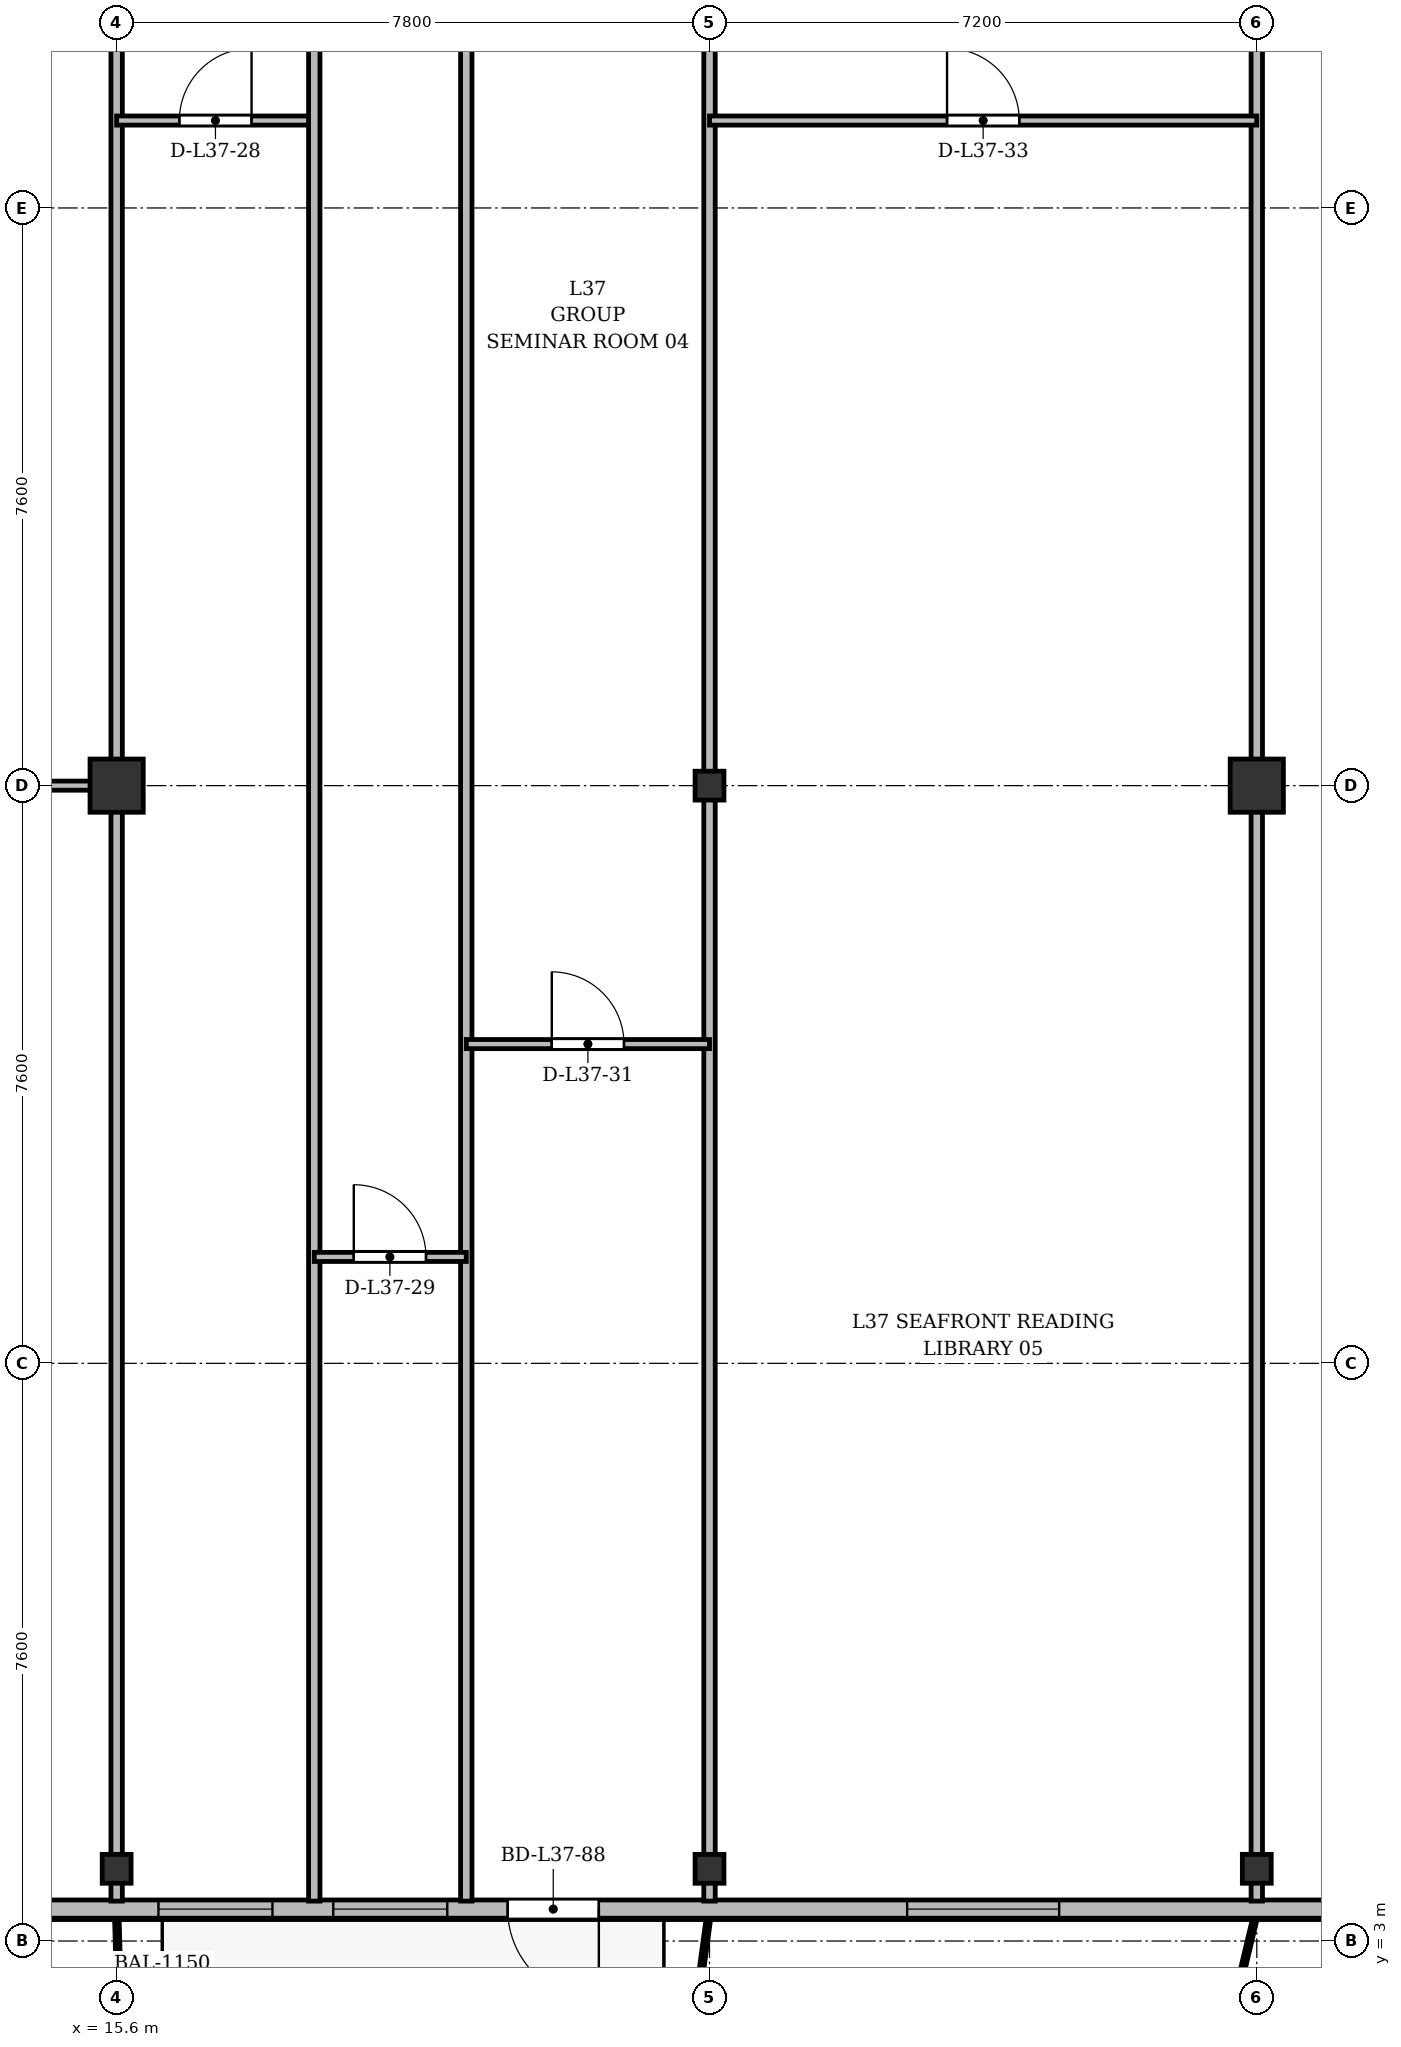
"""IFC4 building model, lengths in metres.
Left out: names, types, materials, properties, quantities, classifications, styles, units other than length and angle.
Written with IfcOpenShell. Run it as: python <this file> out.ifc"""

import sys

from ifc_helpers import new_model, si_unit, direction, frame, frame_2d, origin, origin_2d, place, context, subcontext, project, spatial, rectangle, i_section, extrude, source, transform, mapped, element, fill, save


model = new_model("IFC4")
c1 = context("Model", 3, precision=1e-05, world=origin(), true_north=direction((0.0, 1.0)))
c2 = subcontext(c1, "Body", "Model", "MODEL_VIEW")
j1 = project(units=[si_unit("LENGTHUNIT", "METRE"), si_unit("PLANEANGLEUNIT", "RADIAN")], contexts=[c1])
p1 = place(None, origin())
s1 = spatial("IfcSite", under=j1, at=p1, CompositionType="ELEMENT")
p2 = place(p1, origin())
s2 = spatial("IfcBuilding", under=s1, at=p2, CompositionType="ELEMENT")
p3 = place(p2, frame((0.0, 0.0, 142.9)))
s3 = spatial("IfcBuildingStorey", under=s2, at=p3, CompositionType="ELEMENT", Elevation=142.9)
m1 = source(origin(), c2, "Body", "SweptSolid", [
    extrude(i_section(OverallWidth=0.38, OverallDepth=0.38, WebThickness=0.02, FlangeThickness=0.03, at=origin_2d()), origin(), (0.0, 0.0, 1.0), 3.6),
])
p4 = place(p3, frame((15.6, 3.95, 0.0), z_axis=(0.0, 0.0, 1.0), x_axis=(1.0, 0.0, 0.0)))
e1 = element("IfcColumn", 1, at=p4, inside=s3, PredefinedType="COLUMN", context=c2, shape_type="MappedRepresentation", body=[
    mapped(m1, transform((0.0, 0.0, 0.0), x_axis=(1.0, 0.0, 0.0), y_axis=(0.0, 1.0, 0.0), z_axis=(0.0, 0.0, 1.0), scale=1.0)),
])
m2 = source(origin(), c2, "Body", "SweptSolid", [
    extrude(rectangle(XDim=0.7, YDim=0.7, at=origin_2d()), origin(), (0.0, 0.0, 1.0), 3.6),
])
p5 = place(p3, frame((15.6, 18.2, 0.0), z_axis=(0.0, 0.0, 1.0), x_axis=(1.0, 0.0, 0.0)))
e2 = element("IfcColumn", 2, at=p5, inside=s3, PredefinedType="COLUMN", context=c2, shape_type="MappedRepresentation", body=[
    mapped(m2, transform((0.0, 0.0, 0.0), x_axis=(1.0, 0.0, 0.0), y_axis=(0.0, 1.0, 0.0), z_axis=(0.0, 0.0, 1.0), scale=1.0)),
])
for number, where, z_axis, x_axis in (
    (3, (23.4, 3.95, 0.0), (0.0, 0.0, 1.0), (1.0, 0.0, 0.0)),
    (4, (23.4, 18.2, 0.0), (0.0, 0.0, 1.0), (1.0, 0.0, 0.0)),
    (5, (30.6, 3.95, 0.0), (0.0, 0.0, 1.0), (1.0, 0.0, 0.0)),
):
    element("IfcColumn", number, at=place(p3, frame(where, z_axis=z_axis, x_axis=x_axis)), inside=s3, PredefinedType="COLUMN", context=c2, shape_type="MappedRepresentation", body=[
        mapped(m1, transform((0.0, 0.0, 0.0), x_axis=(1.0, 0.0, 0.0), y_axis=(0.0, 1.0, 0.0), z_axis=(0.0, 0.0, 1.0), scale=1.0)),
    ])
p6 = place(p3, frame((30.6, 18.2, 0.0), z_axis=(0.0, 0.0, 1.0), x_axis=(1.0, 0.0, 0.0)))
e6 = element("IfcColumn", 6, at=p6, inside=s3, PredefinedType="COLUMN", context=c2, shape_type="MappedRepresentation", body=[
    mapped(m2, transform((0.0, 0.0, 0.0), x_axis=(1.0, 0.0, 0.0), y_axis=(0.0, 1.0, 0.0), z_axis=(0.0, 0.0, 1.0), scale=1.0)),
])
p7 = place(p3, frame((63.6, 3.42, 0.0), z_axis=(0.0, 0.0, 1.0), x_axis=(-1.0, 0.0, 0.0)))
e7 = element("IfcWall", 7, at=p7, inside=s3, PredefinedType="SOLIDWALL", context=c2, shape_type="SweptSolid", body=[
    extrude(rectangle(XDim=52.8, YDim=0.24, at=frame_2d((26.4, 0.0))), origin(), (0.0, 0.0, 1.0), 3.35),
])
p8 = place(p7, frame((1.695, 0.0, 0.9)))
e8 = element("IfcOpeningElement", 8, at=p8, cuts=e7, PredefinedType="OPENING", context=c2, shape_type="SweptSolid", body=[
    extrude(rectangle(XDim=1.5, YDim=1.75, at=frame_2d((0.75, 0.875))), frame((0.0, 0.13, 0.0), z_axis=(0.0, -1.0, 0.0), x_axis=(1.0, 0.0, 0.0)), (0.0, 0.0, 1.0), 0.26),
])
p9 = place(p7, frame((5.1, 0.0, 0.9)))
e9 = element("IfcOpeningElement", 9, at=p9, cuts=e7, PredefinedType="OPENING", context=c2, shape_type="SweptSolid", body=[
    extrude(rectangle(XDim=2.0, YDim=1.95, at=frame_2d((1.0, 0.975))), frame((0.0, 0.13, 0.0), z_axis=(0.0, -1.0, 0.0), x_axis=(1.0, 0.0, 0.0)), (0.0, 0.0, 1.0), 0.26),
])
p10 = place(p7, frame((7.65, 0.0, 0.9)))
e10 = element("IfcOpeningElement", 10, at=p10, cuts=e7, PredefinedType="OPENING", context=c2, shape_type="SweptSolid", body=[
    extrude(rectangle(XDim=1.5, YDim=1.75, at=frame_2d((0.75, 0.875))), frame((0.0, 0.13, 0.0), z_axis=(0.0, -1.0, 0.0), x_axis=(1.0, 0.0, 0.0)), (0.0, 0.0, 1.0), 0.26),
])
p11 = place(p7, frame((10.1, 0.0, 0.9)))
e11 = element("IfcOpeningElement", 11, at=p11, cuts=e7, PredefinedType="OPENING", context=c2, shape_type="SweptSolid", body=[
    extrude(rectangle(XDim=1.8, YDim=1.8, at=frame_2d((0.9, 0.9))), frame((0.0, 0.13, 0.0), z_axis=(0.0, -1.0, 0.0), x_axis=(1.0, 0.0, 0.0)), (0.0, 0.0, 1.0), 0.26),
])
p12 = place(p7, frame((14.417, 0.0, 0.0)))
e12 = element("IfcOpeningElement", 12, at=p12, cuts=e7, PredefinedType="OPENING", context=c2, shape_type="SweptSolid", body=[
    extrude(rectangle(XDim=1.2, YDim=2.2, at=frame_2d((0.6, 1.1))), frame((0.0, 0.13, 0.0), z_axis=(0.0, -1.0, 0.0), x_axis=(1.0, 0.0, 0.0)), (0.0, 0.0, 1.0), 0.26),
])
p13 = place(p7, frame((25.65, 0.0, 0.9)))
e13 = element("IfcOpeningElement", 13, at=p13, cuts=e7, PredefinedType="OPENING", context=c2, shape_type="SweptSolid", body=[
    extrude(rectangle(XDim=1.5, YDim=1.75, at=frame_2d((0.75, 0.875))), frame((0.0, 0.13, 0.0), z_axis=(0.0, -1.0, 0.0), x_axis=(1.0, 0.0, 0.0)), (0.0, 0.0, 1.0), 0.26),
])
p14 = place(p7, frame((35.6, 0.0, 0.9)))
e14 = element("IfcOpeningElement", 14, at=p14, cuts=e7, PredefinedType="OPENING", context=c2, shape_type="SweptSolid", body=[
    extrude(rectangle(XDim=2.0, YDim=1.95, at=frame_2d((1.0, 0.975))), frame((0.0, 0.13, 0.0), z_axis=(0.0, -1.0, 0.0), x_axis=(1.0, 0.0, 0.0)), (0.0, 0.0, 1.0), 0.26),
])
p15 = place(p7, frame((41.656, 0.0, 0.0)))
e15 = element("IfcOpeningElement", 15, at=p15, cuts=e7, PredefinedType="OPENING", context=c2, shape_type="SweptSolid", body=[
    extrude(rectangle(XDim=1.2, YDim=2.2, at=frame_2d((0.6, 1.1))), frame((0.0, 0.13, 0.0), z_axis=(0.0, -1.0, 0.0), x_axis=(1.0, 0.0, 0.0)), (0.0, 0.0, 1.0), 0.26),
])
p16 = place(p7, frame((43.65, 0.0, 0.9)))
e16 = element("IfcOpeningElement", 16, at=p16, cuts=e7, PredefinedType="OPENING", context=c2, shape_type="SweptSolid", body=[
    extrude(rectangle(XDim=1.5, YDim=1.75, at=frame_2d((0.75, 0.875))), frame((0.0, 0.13, 0.0), z_axis=(0.0, -1.0, 0.0), x_axis=(1.0, 0.0, 0.0)), (0.0, 0.0, 1.0), 0.26),
])
p17 = place(p7, frame((45.95, 0.0, 0.9)))
e17 = element("IfcOpeningElement", 17, at=p17, cuts=e7, PredefinedType="OPENING", context=c2, shape_type="SweptSolid", body=[
    extrude(rectangle(XDim=1.5, YDim=1.75, at=frame_2d((0.75, 0.875))), frame((0.0, 0.13, 0.0), z_axis=(0.0, -1.0, 0.0), x_axis=(1.0, 0.0, 0.0)), (0.0, 0.0, 1.0), 0.26),
])
p18 = place(p7, frame((49.605, 0.0, 0.9)))
e18 = element("IfcOpeningElement", 18, at=p18, cuts=e7, PredefinedType="OPENING", context=c2, shape_type="SweptSolid", body=[
    extrude(rectangle(XDim=1.5, YDim=1.75, at=frame_2d((0.75, 0.875))), frame((0.0, 0.13, 0.0), z_axis=(0.0, -1.0, 0.0), x_axis=(1.0, 0.0, 0.0)), (0.0, 0.0, 1.0), 0.26),
])
for number, where, z_axis, x_axis in (
    (19, (15.6, 3.525, 0.0), (0.0, 0.0, 1.0), (0.0, 1.0, 0.0)),
    (20, (23.4, 3.525, 0.0), (0.0, 0.0, 1.0), (0.0, 1.0, 0.0)),
    (21, (30.6, 3.525, 0.0), (0.0, 0.0, 1.0), (0.0, 1.0, 0.0)),
):
    element("IfcWall", number, at=place(p3, frame(where, z_axis=z_axis, x_axis=x_axis)), inside=s3, PredefinedType="PARTITIONING", context=c2, shape_type="SweptSolid", body=[
        extrude(rectangle(XDim=27.275, YDim=0.15, at=frame_2d((13.638, 0.0))), origin(), (0.0, 0.0, 1.0), 2.85),
    ])
p19 = place(p3, frame((8.025, 18.2, 0.0), z_axis=(0.0, 0.0, 1.0), x_axis=(1.0, 0.0, 0.0)))
e22 = element("IfcWall", 22, at=p19, inside=s3, PredefinedType="PARTITIONING", context=c2, shape_type="SweptSolid", body=[
    extrude(rectangle(XDim=7.575, YDim=0.12, at=frame_2d((3.788, 0.0))), origin(), (0.0, 0.0, 1.0), 2.75),
])
p20 = place(p19, frame((3.312, 0.0, 0.0)))
e23 = element("IfcOpeningElement", 23, at=p20, cuts=e22, PredefinedType="OPENING", context=c2, shape_type="SweptSolid", body=[
    extrude(rectangle(XDim=0.95, YDim=2.15, at=frame_2d((0.475, 1.075))), frame((0.0, 0.07, 0.0), z_axis=(0.0, -1.0, 0.0), x_axis=(1.0, 0.0, 0.0)), (0.0, 0.0, 1.0), 0.14),
])
p21 = place(p3, frame((15.6, 26.95, 0.0), z_axis=(0.0, 0.0, 1.0), x_axis=(1.0, 0.0, 0.0)))
e24 = element("IfcWall", 24, at=p21, inside=s3, PredefinedType="PARTITIONING", context=c2, shape_type="SweptSolid", body=[
    extrude(rectangle(XDim=2.6, YDim=0.12, at=frame_2d((1.3, 0.0))), origin(), (0.0, 0.0, 1.0), 2.85),
])
p22 = place(p21, frame((0.825, 0.0, 0.0)))
e25 = element("IfcOpeningElement", 25, at=p22, cuts=e24, PredefinedType="OPENING", context=c2, shape_type="SweptSolid", body=[
    extrude(rectangle(XDim=0.95, YDim=2.15, at=frame_2d((0.475, 1.075))), frame((0.0, 0.07, 0.0), z_axis=(0.0, -1.0, 0.0), x_axis=(1.0, 0.0, 0.0)), (0.0, 0.0, 1.0), 0.14),
])
for number, where, z_axis, x_axis in (
    (26, (18.2, 3.525, 0.0), (0.0, 0.0, 1.0), (0.0, 1.0, 0.0)),
    (27, (20.2, 3.525, 0.0), (0.0, 0.0, 1.0), (0.0, 1.0, 0.0)),
):
    element("IfcWall", number, at=place(p3, frame(where, z_axis=z_axis, x_axis=x_axis)), inside=s3, PredefinedType="PARTITIONING", context=c2, shape_type="SweptSolid", body=[
        extrude(rectangle(XDim=27.275, YDim=0.15, at=frame_2d((13.638, 0.0))), origin(), (0.0, 0.0, 1.0), 2.75),
    ])
p23 = place(p3, frame((18.2, 12.0, 0.0), z_axis=(0.0, 0.0, 1.0), x_axis=(1.0, 0.0, 0.0)))
e28 = element("IfcWall", 28, at=p23, inside=s3, PredefinedType="PARTITIONING", context=c2, shape_type="SweptSolid", body=[
    extrude(rectangle(XDim=2.0, YDim=0.12, at=frame_2d((1.0, 0.0))), origin(), (0.0, 0.0, 1.0), 3.35),
])
p24 = place(p23, frame((0.52, 0.0, 0.0)))
e29 = element("IfcOpeningElement", 29, at=p24, cuts=e28, PredefinedType="OPENING", context=c2, shape_type="SweptSolid", body=[
    extrude(rectangle(XDim=0.95, YDim=2.15, at=frame_2d((0.475, 1.075))), frame((0.0, 0.07, 0.0), z_axis=(0.0, -1.0, 0.0), x_axis=(1.0, 0.0, 0.0)), (0.0, 0.0, 1.0), 0.14),
])
p25 = place(p3, frame((20.2, 14.8, 0.0), z_axis=(0.0, 0.0, 1.0), x_axis=(1.0, 0.0, 0.0)))
e30 = element("IfcWall", 30, at=p25, inside=s3, PredefinedType="PARTITIONING", context=c2, shape_type="SweptSolid", body=[
    extrude(rectangle(XDim=3.2, YDim=0.12, at=frame_2d((1.6, 0.0))), origin(), (0.0, 0.0, 1.0), 2.85),
])
p26 = place(p25, frame((1.125, 0.0, 0.0)))
e31 = element("IfcOpeningElement", 31, at=p26, cuts=e30, PredefinedType="OPENING", context=c2, shape_type="SweptSolid", body=[
    extrude(rectangle(XDim=0.95, YDim=2.15, at=frame_2d((0.475, 1.075))), frame((0.0, 0.07, 0.0), z_axis=(0.0, -1.0, 0.0), x_axis=(1.0, 0.0, 0.0)), (0.0, 0.0, 1.0), 0.14),
])
p27 = place(p3, frame((23.4, 26.95, 0.0), z_axis=(0.0, 0.0, 1.0), x_axis=(1.0, 0.0, 0.0)))
e32 = element("IfcWall", 32, at=p27, inside=s3, PredefinedType="PARTITIONING", context=c2, shape_type="SweptSolid", body=[
    extrude(rectangle(XDim=7.2, YDim=0.12, at=frame_2d((3.6, 0.0))), origin(), (0.0, 0.0, 1.0), 2.85),
])
p28 = place(p27, frame((3.125, 0.0, 0.0)))
e33 = element("IfcOpeningElement", 33, at=p28, cuts=e32, PredefinedType="OPENING", context=c2, shape_type="SweptSolid", body=[
    extrude(rectangle(XDim=0.95, YDim=2.15, at=frame_2d((0.475, 1.075))), frame((0.0, 0.07, 0.0), z_axis=(0.0, -1.0, 0.0), x_axis=(1.0, 0.0, 0.0)), (0.0, 0.0, 1.0), 0.14),
])
m3 = source(origin(), c2, "Body", "SweptSolid", [
    extrude(rectangle(XDim=2.0, YDim=1.95, at=frame_2d((1.0, 0.975))), frame((0.0, 0.03, 0.0), z_axis=(0.0, -1.0, 0.0), x_axis=(1.0, 0.0, 0.0)), (0.0, 0.0, 1.0), 0.06),
])
p29 = place(p14, origin())
e34 = element("IfcWindow", 34, at=p29, inside=s3, PartitioningType="SINGLE_PANEL", PredefinedType="WINDOW", context=c2, shape_type="MappedRepresentation", body=[
    mapped(m3, transform((0.0, 0.0, 0.0), x_axis=(1.0, 0.0, 0.0), y_axis=(0.0, 1.0, 0.0), z_axis=(0.0, 0.0, 1.0), scale=1.0)),
])
fill(e14, e34)
m4 = source(origin(), c2, "Body", "SweptSolid", [
    extrude(rectangle(XDim=1.2, YDim=2.2, at=frame_2d((0.6, 1.1))), frame((0.0, 0.025, 0.0), z_axis=(0.0, -1.0, 0.0), x_axis=(1.0, 0.0, 0.0)), (0.0, 0.0, 1.0), 0.05),
])
p30 = place(p15, origin())
e35 = element("IfcDoor", 35, at=p30, inside=s3, OperationType="SINGLE_SWING_LEFT", PredefinedType="DOOR", context=c2, shape_type="MappedRepresentation", body=[
    mapped(m4, transform((0.0, 0.0, 0.0), x_axis=(1.0, 0.0, 0.0), y_axis=(0.0, 1.0, 0.0), z_axis=(0.0, 0.0, 1.0), scale=1.0)),
])
fill(e15, e35)
m5 = source(origin(), c2, "Body", "SweptSolid", [
    extrude(rectangle(XDim=1.5, YDim=1.75, at=frame_2d((0.75, 0.875))), frame((0.0, 0.03, 0.0), z_axis=(0.0, -1.0, 0.0), x_axis=(1.0, 0.0, 0.0)), (0.0, 0.0, 1.0), 0.06),
])
p31 = place(p16, origin())
e36 = element("IfcWindow", 36, at=p31, inside=s3, PartitioningType="SINGLE_PANEL", PredefinedType="WINDOW", context=c2, shape_type="MappedRepresentation", body=[
    mapped(m5, transform((0.0, 0.0, 0.0), x_axis=(1.0, 0.0, 0.0), y_axis=(0.0, 1.0, 0.0), z_axis=(0.0, 0.0, 1.0), scale=1.0)),
])
fill(e16, e36)
p32 = place(p17, origin())
e37 = element("IfcWindow", 37, at=p32, inside=s3, PartitioningType="SINGLE_PANEL", PredefinedType="WINDOW", context=c2, shape_type="MappedRepresentation", body=[
    mapped(m5, transform((0.0, 0.0, 0.0), x_axis=(1.0, 0.0, 0.0), y_axis=(0.0, 1.0, 0.0), z_axis=(0.0, 0.0, 1.0), scale=1.0)),
])
fill(e17, e37)
m6 = source(origin(), c2, "Body", "SweptSolid", [
    extrude(rectangle(XDim=0.95, YDim=2.15, at=frame_2d((0.475, 1.075))), frame((0.0, 0.025, 0.0), z_axis=(0.0, -1.0, 0.0), x_axis=(1.0, 0.0, 0.0)), (0.0, 0.0, 1.0), 0.05),
])
p33 = place(p22, origin())
e38 = element("IfcDoor", 38, at=p33, inside=s3, OperationType="SINGLE_SWING_RIGHT", PredefinedType="DOOR", context=c2, shape_type="MappedRepresentation", body=[
    mapped(m6, transform((0.0, 0.0, 0.0), x_axis=(1.0, 0.0, 0.0), y_axis=(0.0, 1.0, 0.0), z_axis=(0.0, 0.0, 1.0), scale=1.0)),
])
fill(e25, e38)
p34 = place(p24, origin())
e39 = element("IfcDoor", 39, at=p34, inside=s3, OperationType="SINGLE_SWING_LEFT", PredefinedType="DOOR", context=c2, shape_type="MappedRepresentation", body=[
    mapped(m6, transform((0.0, 0.0, 0.0), x_axis=(1.0, 0.0, 0.0), y_axis=(0.0, 1.0, 0.0), z_axis=(0.0, 0.0, 1.0), scale=1.0)),
])
fill(e29, e39)
p35 = place(p26, origin())
e40 = element("IfcDoor", 40, at=p35, inside=s3, OperationType="SINGLE_SWING_LEFT", PredefinedType="DOOR", context=c2, shape_type="MappedRepresentation", body=[
    mapped(m6, transform((0.0, 0.0, 0.0), x_axis=(1.0, 0.0, 0.0), y_axis=(0.0, 1.0, 0.0), z_axis=(0.0, 0.0, 1.0), scale=1.0)),
])
fill(e31, e40)
p36 = place(p28, origin())
e41 = element("IfcDoor", 41, at=p36, inside=s3, OperationType="SINGLE_SWING_LEFT", PredefinedType="DOOR", context=c2, shape_type="MappedRepresentation", body=[
    mapped(m6, transform((0.0, 0.0, 0.0), x_axis=(1.0, 0.0, 0.0), y_axis=(0.0, 1.0, 0.0), z_axis=(0.0, 0.0, 1.0), scale=1.0)),
])
fill(e33, e41)
save(model, sys.argv[1])
